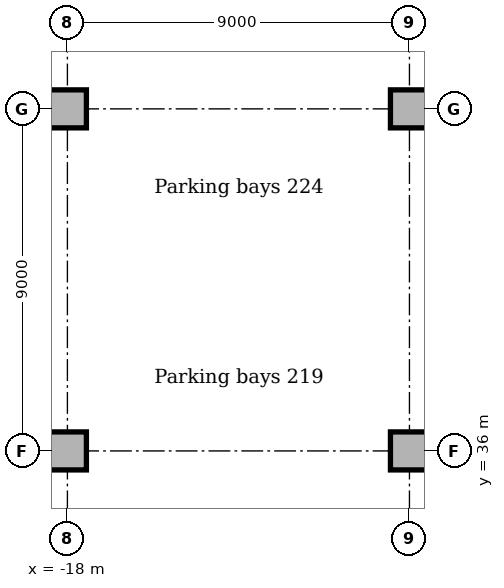
"""IFC4 building model, lengths in metres.
Left out: names, types, materials, properties, quantities, classifications, styles, units other than length and angle.
Written with IfcOpenShell. Run it as: python <this file> out.ifc"""

import sys

from ifc_helpers import new_model, si_unit, direction, frame, origin, origin_2d, place, context, subcontext, project, spatial, rectangle, extrude, element, save


model = new_model("IFC4")
c1 = context("Model", 3, precision=1e-05, world=origin(), true_north=direction((0.0, 1.0)))
c2 = subcontext(c1, "Body", "Model", "MODEL_VIEW")
j1 = project(units=[si_unit("LENGTHUNIT", "METRE"), si_unit("PLANEANGLEUNIT", "RADIAN")], contexts=[c1])
p1 = place(None, origin())
s1 = spatial("IfcSite", under=j1, at=p1, CompositionType="ELEMENT")
p2 = place(p1, origin())
s2 = spatial("IfcBuilding", under=s1, at=p2, CompositionType="ELEMENT")
p3 = place(p2, frame((0.0, 0.0, -9.5)))
s3 = spatial("IfcBuildingStorey", under=s2, at=p3, CompositionType="ELEMENT", Elevation=-9.5)
for number, where, z_axis, x_axis in (
    (1, (-18.0, 36.0, 0.0), (0.0, 0.0, 1.0), (1.0, 0.0, 0.0)),
    (2, (-18.0, 45.0, 0.0), (0.0, 0.0, 1.0), (1.0, 0.0, 0.0)),
    (3, (-9.0, 36.0, 0.0), (0.0, 0.0, 1.0), (1.0, 0.0, 0.0)),
    (4, (-9.0, 45.0, 0.0), (0.0, 0.0, 1.0), (1.0, 0.0, 0.0)),
):
    element("IfcColumn", number, at=place(p3, frame(where, z_axis=z_axis, x_axis=x_axis)), inside=s3, PredefinedType="COLUMN", context=c2, shape_type="SweptSolid", body=[
        extrude(rectangle(XDim=1.0, YDim=1.0, at=origin_2d()), origin(), (0.0, 0.0, 1.0), 4.15),
    ])
save(model, sys.argv[1])
